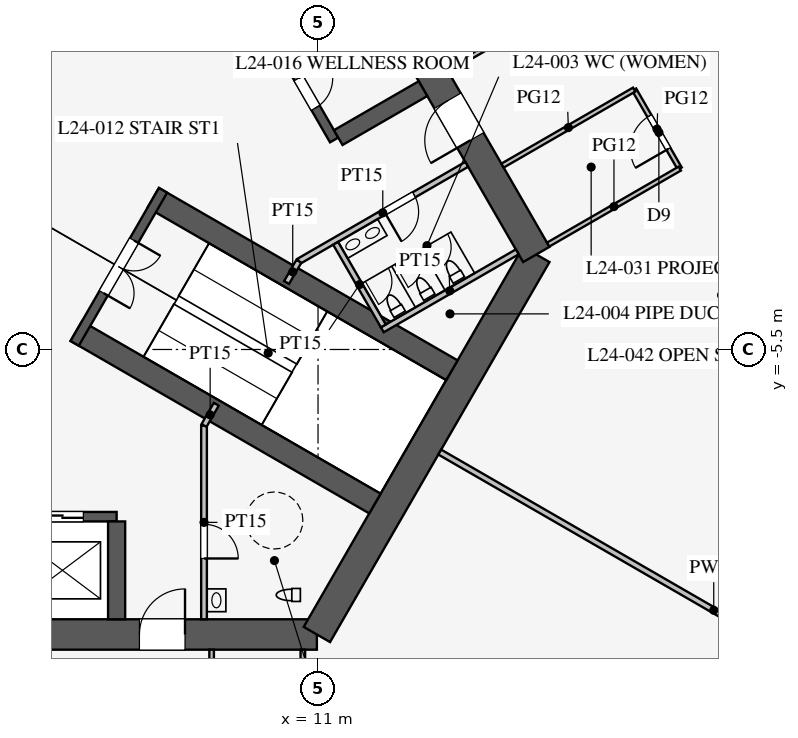
"""IFC4 building model, lengths in metres.
Left out: names, types, materials, properties, quantities, classifications, styles, units other than length and angle.
Written with IfcOpenShell. Run it as: python <this file> out.ifc"""

import sys

from ifc_helpers import new_model, si_unit, direction, frame, frame_2d, origin, place, context, subcontext, project, spatial, rectangle, extrude, element, fill, save


model = new_model("IFC4")
c1 = context("Model", 3, precision=1e-05, world=origin(), true_north=direction((0.0, 1.0)))
c2 = subcontext(c1, "Body", "Model", "MODEL_VIEW")
j1 = project(units=[si_unit("LENGTHUNIT", "METRE"), si_unit("PLANEANGLEUNIT", "RADIAN")], contexts=[c1])
p1 = place(None, origin())
s1 = spatial("IfcSite", under=j1, at=p1, CompositionType="ELEMENT")
p2 = place(p1, origin())
s2 = spatial("IfcBuilding", under=s1, at=p2, CompositionType="ELEMENT")
p3 = place(p2, frame((0.0, 0.0, 107.3)))
s3 = spatial("IfcBuildingStorey", under=s2, at=p3, CompositionType="ELEMENT", Elevation=107.3)
p4 = place(p3, frame((-10.97, -13.0, 0.0), z_axis=(0.0, 0.0, 1.0), x_axis=(1.0, 0.0, 0.0)))
e1 = element("IfcWall", 1, at=p4, inside=s3, PredefinedType="SHEAR", context=c2, shape_type="SweptSolid", body=[
    extrude(rectangle(XDim=21.939, YDim=0.8, at=frame_2d((10.97, 0.0))), origin(), (0.0, 0.0, 1.0), 4.2),
])
p5 = place(p4, frame((17.27, 0.0, 0.0)))
e2 = element("IfcOpeningElement", 2, at=p5, cuts=e1, PredefinedType="OPENING", context=c2, shape_type="SweptSolid", body=[
    extrude(rectangle(XDim=1.2, YDim=2.1, at=frame_2d((0.6, 1.05))), frame((0.0, 0.41, 0.0), z_axis=(0.0, -1.0, 0.0), x_axis=(1.0, 0.0, 0.0)), (0.0, 0.0, 1.0), 0.82),
])
p6 = place(p4, frame((3.47, 0.0, 0.0)))
e3 = element("IfcOpeningElement", 3, at=p6, cuts=e1, PredefinedType="OPENING", context=c2, shape_type="SweptSolid", body=[
    extrude(rectangle(XDim=1.2, YDim=2.1, at=frame_2d((0.6, 1.05))), frame((0.0, 0.41, 0.0), z_axis=(0.0, -1.0, 0.0), x_axis=(1.0, 0.0, 0.0)), (0.0, 0.0, 1.0), 0.82),
])
p7 = place(p3, frame((10.97, -13.0, 0.0), z_axis=(0.0, 0.0, 1.0), x_axis=(0.499995765644, 0.866027848477, 0.0)))
e4 = element("IfcWall", 4, at=p7, inside=s3, PredefinedType="SHEAR", context=c2, shape_type="SweptSolid", body=[
    extrude(rectangle(XDim=11.547, YDim=0.8, at=frame_2d((5.773, 0.0))), origin(), (0.0, 0.0, 1.0), 4.2),
])
p8 = place(p3, frame((16.743, -3.0, 0.0), z_axis=(0.0, 0.0, 1.0), x_axis=(-0.500002442456, 0.866023993627, 0.0)))
e5 = element("IfcWall", 5, at=p8, inside=s3, PredefinedType="SHEAR", context=c2, shape_type="SweptSolid", body=[
    extrude(rectangle(XDim=21.939, YDim=0.8, at=frame_2d((10.97, 0.0))), origin(), (0.0, 0.0, 1.0), 4.2),
])
p9 = place(p8, frame((17.27, 0.0, 0.0)))
e6 = element("IfcOpeningElement", 6, at=p9, cuts=e5, PredefinedType="OPENING", context=c2, shape_type="SweptSolid", body=[
    extrude(rectangle(XDim=1.2, YDim=2.1, at=frame_2d((0.6, 1.05))), frame((0.0, 0.41, 0.0), z_axis=(0.0, -1.0, 0.0), x_axis=(1.0, 0.0, 0.0)), (0.0, 0.0, 1.0), 0.82),
])
p10 = place(p8, frame((3.47, 0.0, 0.0)))
e7 = element("IfcOpeningElement", 7, at=p10, cuts=e5, PredefinedType="OPENING", context=c2, shape_type="SweptSolid", body=[
    extrude(rectangle(XDim=1.2, YDim=2.1, at=frame_2d((0.6, 1.05))), frame((0.0, 0.41, 0.0), z_axis=(0.0, -1.0, 0.0), x_axis=(1.0, 0.0, 0.0)), (0.0, 0.0, 1.0), 0.82),
])
p11 = place(p3, frame((-5.7, -9.9, 0.0), z_axis=(0.0, 0.0, 1.0), x_axis=(1.0, 0.0, 0.0)))
e8 = element("IfcWall", 8, at=p11, inside=s3, PredefinedType="SHEAR", context=c2, shape_type="SweptSolid", body=[
    extrude(rectangle(XDim=11.4, YDim=0.25, at=frame_2d((5.7, 0.0))), origin(), (0.0, 0.0, 1.0), 4.2),
])
p12 = place(p11, frame((0.875, 0.0, 0.0)))
e9 = element("IfcOpeningElement", 9, at=p12, cuts=e8, PredefinedType="OPENING", context=c2, shape_type="SweptSolid", body=[
    extrude(rectangle(XDim=1.1, YDim=2.2, at=frame_2d((0.55, 1.1))), frame((0.0, 0.135, 0.0), z_axis=(0.0, -1.0, 0.0), x_axis=(1.0, 0.0, 0.0)), (0.0, 0.0, 1.0), 0.27),
])
p13 = place(p11, frame((3.725, 0.0, 0.0)))
e10 = element("IfcOpeningElement", 10, at=p13, cuts=e8, PredefinedType="OPENING", context=c2, shape_type="SweptSolid", body=[
    extrude(rectangle(XDim=1.1, YDim=2.2, at=frame_2d((0.55, 1.1))), frame((0.0, 0.135, 0.0), z_axis=(0.0, -1.0, 0.0), x_axis=(1.0, 0.0, 0.0)), (0.0, 0.0, 1.0), 0.27),
])
p14 = place(p11, frame((6.575, 0.0, 0.0)))
e11 = element("IfcOpeningElement", 11, at=p14, cuts=e8, PredefinedType="OPENING", context=c2, shape_type="SweptSolid", body=[
    extrude(rectangle(XDim=1.1, YDim=2.2, at=frame_2d((0.55, 1.1))), frame((0.0, 0.135, 0.0), z_axis=(0.0, -1.0, 0.0), x_axis=(1.0, 0.0, 0.0)), (0.0, 0.0, 1.0), 0.27),
])
p15 = place(p11, frame((9.425, 0.0, 0.0)))
e12 = element("IfcOpeningElement", 12, at=p15, cuts=e8, PredefinedType="OPENING", context=c2, shape_type="SweptSolid", body=[
    extrude(rectangle(XDim=1.1, YDim=2.2, at=frame_2d((0.55, 1.1))), frame((0.0, 0.135, 0.0), z_axis=(0.0, -1.0, 0.0), x_axis=(1.0, 0.0, 0.0)), (0.0, 0.0, 1.0), 0.27),
])
p16 = place(p3, frame((5.7, -10.025, 0.0), z_axis=(0.0, 0.0, 1.0), x_axis=(0.0, -1.0, 0.0)))
e13 = element("IfcWall", 13, at=p16, inside=s3, PredefinedType="SHEAR", context=c2, shape_type="SweptSolid", body=[
    extrude(rectangle(XDim=2.575, YDim=0.45, at=frame_2d((1.288, 0.0))), origin(), (0.0, 0.0, 1.0), 4.2),
])
p17 = place(p3, frame((11.424, 0.014, 0.0), z_axis=(0.0, 0.0, 1.0), x_axis=(-0.500001763848, 0.866024385424, 0.0)))
e14 = element("IfcWall", 14, at=p17, inside=s3, PredefinedType="SHEAR", context=c2, shape_type="SweptSolid", body=[
    extrude(rectangle(XDim=11.4, YDim=0.25, at=frame_2d((5.7, 0.0))), origin(), (0.0, 0.0, 1.0), 4.2),
])
p18 = place(p17, frame((0.975, 0.0, 0.0)))
e15 = element("IfcOpeningElement", 15, at=p18, cuts=e14, PredefinedType="OPENING", context=c2, shape_type="SweptSolid", body=[
    extrude(rectangle(XDim=0.9, YDim=2.1, at=frame_2d((0.45, 1.05))), frame((0.0, 0.135, 0.0), z_axis=(0.0, -1.0, 0.0), x_axis=(1.0, 0.0, 0.0)), (0.0, 0.0, 1.0), 0.27),
])
p19 = place(p17, frame((3.825, 0.0, 0.0)))
e16 = element("IfcOpeningElement", 16, at=p19, cuts=e14, PredefinedType="OPENING", context=c2, shape_type="SweptSolid", body=[
    extrude(rectangle(XDim=0.9, YDim=2.1, at=frame_2d((0.45, 1.05))), frame((0.0, 0.135, 0.0), z_axis=(0.0, -1.0, 0.0), x_axis=(1.0, 0.0, 0.0)), (0.0, 0.0, 1.0), 0.27),
])
p20 = place(p3, frame((11.532, 0.076, 0.0), z_axis=(0.0, 0.0, 1.0), x_axis=(0.866005588531, 0.500034319456, 0.0)))
e17 = element("IfcWall", 17, at=p20, inside=s3, PredefinedType="SHEAR", context=c2, shape_type="SweptSolid", body=[
    extrude(rectangle(XDim=2.575, YDim=0.45, at=frame_2d((1.288, 0.0))), origin(), (0.0, 0.0, 1.0), 4.2),
])
for number, where, z_axis, x_axis in (
    (18, (4.638, -5.016, 0.0), (0.0, 0.0, 1.0), (0.866, -0.5, 0.0)),
    (19, (6.663, -1.509, 0.0), (0.0, 0.0, 1.0), (0.866, -0.5, 0.0)),
):
    element("IfcWall", number, at=place(p3, frame(where, z_axis=z_axis, x_axis=x_axis)), inside=s3, PredefinedType="SHEAR", context=c2, shape_type="SweptSolid", body=[
        extrude(rectangle(XDim=9.075, YDim=0.6, at=frame_2d((4.538, 0.0))), origin(), (0.0, 0.0, 1.0), 4.2),
    ])
p21 = place(p3, frame((4.597, -5.339, 0.0), z_axis=(0.0, 0.0, 1.0), x_axis=(0.499984536904, 0.866034331223, 0.0)))
e20 = element("IfcWall", 20, at=p21, inside=s3, PredefinedType="SHEAR", context=c2, shape_type="SweptSolid", body=[
    extrude(rectangle(XDim=4.65, YDim=0.25, at=frame_2d((2.325, 0.0))), origin(), (0.0, 0.0, 1.0), 4.2),
])
p22 = place(p21, frame((1.525, 0.0, 0.0)))
e21 = element("IfcOpeningElement", 21, at=p22, cuts=e20, PredefinedType="OPENING", context=c2, shape_type="SweptSolid", body=[
    extrude(rectangle(XDim=1.6, YDim=2.1, at=frame_2d((0.8, 1.05))), frame((0.0, 0.135, 0.0), z_axis=(0.0, -1.0, 0.0), x_axis=(1.0, 0.0, 0.0)), (0.0, 0.0, 1.0), 0.27),
])
p23 = place(p3, frame((8.0, -7.5, 0.0), z_axis=(0.0, 0.0, 1.0), x_axis=(0.0, -1.0, 0.0)))
e22 = element("IfcWall", 22, at=p23, inside=s3, PredefinedType="PARTITIONING", context=c2, shape_type="SweptSolid", body=[
    extrude(rectangle(XDim=5.1, YDim=0.15, at=frame_2d((2.55, 0.0))), origin(), (0.0, 0.0, 1.0), 4.0),
])
p24 = place(p23, frame((2.6, 0.0, 0.0)))
e23 = element("IfcOpeningElement", 23, at=p24, cuts=e22, PredefinedType="OPENING", context=c2, shape_type="SweptSolid", body=[
    extrude(rectangle(XDim=0.9, YDim=2.1, at=frame_2d((0.45, 1.05))), frame((0.0, 0.085, 0.0), z_axis=(0.0, -1.0, 0.0), x_axis=(1.0, 0.0, 0.0)), (0.0, 0.0, 1.0), 0.17),
])
p25 = place(p3, frame((10.495, -3.178, 0.0), z_axis=(0.0, 0.0, 1.0), x_axis=(0.86602216432, 0.500005610874, 0.0)))
e24 = element("IfcWall", 24, at=p25, inside=s3, PredefinedType="PARTITIONING", context=c2, shape_type="SweptSolid", body=[
    extrude(rectangle(XDim=5.1, YDim=0.15, at=frame_2d((2.55, 0.0))), origin(), (0.0, 0.0, 1.0), 4.0),
])
p26 = place(p25, frame((2.6, 0.0, 0.0)))
e25 = element("IfcOpeningElement", 25, at=p26, cuts=e24, PredefinedType="OPENING", context=c2, shape_type="SweptSolid", body=[
    extrude(rectangle(XDim=0.9, YDim=2.1, at=frame_2d((0.45, 1.05))), frame((0.0, 0.085, 0.0), z_axis=(0.0, -1.0, 0.0), x_axis=(1.0, 0.0, 0.0)), (0.0, 0.0, 1.0), 0.17),
])
for number, where, z_axis, x_axis in (
    (26, (8.0, -7.5, 0.0), (0.0, 0.0, 1.0), (0.5, 0.866, 0.0)),
    (27, (10.495, -3.178, 0.0), (0.0, 0.0, 1.0), (-0.5, -0.866, 0.0)),
):
    element("IfcWall", number, at=place(p3, frame(where, z_axis=z_axis, x_axis=x_axis)), inside=s3, PredefinedType="PARTITIONING", context=c2, shape_type="SweptSolid", body=[
        extrude(rectangle(XDim=0.645, YDim=0.15, at=frame_2d((0.323, 0.0))), origin(), (0.0, 0.0, 1.0), 4.0),
    ])
p27 = place(p3, frame((12.691, -4.982, 0.0), z_axis=(0.0, 0.0, 1.0), x_axis=(0.8660249478, 0.500000789788, 0.0)))
e28 = element("IfcWall", 28, at=p27, inside=s3, PredefinedType="PARTITIONING", context=c2, shape_type="SweptSolid", body=[
    extrude(rectangle(XDim=4.1, YDim=0.15, at=frame_2d((2.05, 0.0))), origin(), (0.0, 0.0, 1.0), 4.0),
])
p28 = place(p3, frame((11.464, -2.706, 0.0), z_axis=(0.0, 0.0, 1.0), x_axis=(0.50001992892, -0.866013897511, 0.0)))
e29 = element("IfcWall", 29, at=p28, inside=s3, PredefinedType="PARTITIONING", context=c2, shape_type="SweptSolid", body=[
    extrude(rectangle(XDim=2.51, YDim=0.15, at=frame_2d((1.255, 0.0))), origin(), (0.0, 0.0, 1.0), 4.0),
])
p29 = place(p3, frame((14.203, -8.2, 0.0), z_axis=(0.0, 0.0, 1.0), x_axis=(0.866024668836, -0.500001272966, 0.0)))
e30 = element("IfcWall", 30, at=p29, inside=s3, PredefinedType="PARTITIONING", context=c2, shape_type="SweptSolid", body=[
    extrude(rectangle(XDim=16.65, YDim=0.15, at=frame_2d((8.325, 0.0))), origin(), (0.0, 0.0, 1.0), 2.3),
])
for number, where, z_axis, x_axis in (
    (31, (10.6, -13.4, 0.0), (0.0, 0.0, 1.0), (0.0, -1.0, 0.0)),
    (32, (8.2, -13.4, 0.0), (0.0, 0.0, 1.0), (0.0, -1.0, 0.0)),
):
    element("IfcWall", number, at=place(p3, frame(where, z_axis=z_axis, x_axis=x_axis)), inside=s3, PredefinedType="PARTITIONING", context=c2, shape_type="SweptSolid", body=[
        extrude(rectangle(XDim=4.0, YDim=0.12, at=frame_2d((2.0, 0.0))), origin(), (0.0, 0.0, 1.0), 2.9),
    ])
p30 = place(p3, frame((20.519, -0.74, 0.0), z_axis=(0.0, 0.0, 1.0), x_axis=(-0.499957262057, 0.866050077142, 0.0)))
e33 = element("IfcWall", 33, at=p30, inside=s3, PredefinedType="PARTITIONING", context=c2, shape_type="SweptSolid", body=[
    extrude(rectangle(XDim=2.4, YDim=0.12, at=frame_2d((1.2, 0.0))), origin(), (0.0, 0.0, 1.0), 2.9),
])
p31 = place(p30, frame((0.6, 0.0, 0.15)))
e34 = element("IfcOpeningElement", 34, at=p31, cuts=e33, PredefinedType="OPENING", context=c2, shape_type="SweptSolid", body=[
    extrude(rectangle(XDim=1.0, YDim=2.1, at=frame_2d((0.5, 1.05))), frame((0.0, 0.07, 0.0), z_axis=(0.0, -1.0, 0.0), x_axis=(1.0, 0.0, 0.0)), (0.0, 0.0, 1.0), 0.14),
])
for number, where, z_axis, x_axis in (
    (35, (17.055, -2.74, 0.0), (0.0, 0.0, 1.0), (0.866, 0.5, 0.0)),
    (36, (14.405, 1.85, 0.0), (0.0, 0.0, 1.0), (0.866, 0.5, 0.0)),
    (37, (15.855, -0.661, 0.0), (0.0, 0.0, 1.0), (0.866, 0.5, 0.0)),
):
    element("IfcWall", number, at=place(p3, frame(where, z_axis=z_axis, x_axis=x_axis)), inside=s3, PredefinedType="PARTITIONING", context=c2, shape_type="SweptSolid", body=[
        extrude(rectangle(XDim=4.0, YDim=0.12, at=frame_2d((2.0, 0.0))), origin(), (0.0, 0.0, 1.0), 2.9),
    ])
p32 = place(p24, origin())
e38 = element("IfcDoor", 38, at=p32, inside=s3, OperationType="SINGLE_SWING_RIGHT", PredefinedType="DOOR", context=c2, shape_type="SweptSolid", body=[
    extrude(rectangle(XDim=0.9, YDim=2.1, at=frame_2d((0.45, 1.05))), frame((0.0, 0.025, 0.0), z_axis=(0.0, -1.0, 0.0), x_axis=(1.0, 0.0, 0.0)), (0.0, 0.0, 1.0), 0.05),
])
fill(e23, e38)
p33 = place(p26, frame((0.9, 0.0, 0.0), z_axis=(0.0, 0.0, 1.0), x_axis=(-1.0, 0.0, 0.0)))
e39 = element("IfcDoor", 39, at=p33, inside=s3, OperationType="SINGLE_SWING_RIGHT", PredefinedType="DOOR", context=c2, shape_type="SweptSolid", body=[
    extrude(rectangle(XDim=0.9, YDim=2.1, at=frame_2d((0.45, 1.05))), frame((0.0, 0.025, 0.0), z_axis=(0.0, -1.0, 0.0), x_axis=(1.0, 0.0, 0.0)), (0.0, 0.0, 1.0), 0.05),
])
fill(e25, e39)
p34 = place(p22, frame((1.6, 0.0, 0.0), z_axis=(0.0, 0.0, 1.0), x_axis=(-1.0, 0.0, 0.0)))
e40 = element("IfcDoor", 40, at=p34, inside=s3, OperationType="DOUBLE_DOOR_SINGLE_SWING", PredefinedType="DOOR", context=c2, shape_type="SweptSolid", body=[
    extrude(rectangle(XDim=1.6, YDim=2.1, at=frame_2d((0.8, 1.05))), frame((0.0, 0.025, 0.0), z_axis=(0.0, -1.0, 0.0), x_axis=(1.0, 0.0, 0.0)), (0.0, 0.0, 1.0), 0.05),
])
fill(e21, e40)
p35 = place(p5, origin())
e41 = element("IfcDoor", 41, at=p35, inside=s3, OperationType="SINGLE_SWING_RIGHT", PredefinedType="DOOR", context=c2, shape_type="SweptSolid", body=[
    extrude(rectangle(XDim=1.2, YDim=2.1, at=frame_2d((0.6, 1.05))), frame((0.0, 0.025, 0.0), z_axis=(0.0, -1.0, 0.0), x_axis=(1.0, 0.0, 0.0)), (0.0, 0.0, 1.0), 0.05),
])
fill(e2, e41)
p36 = place(p10, origin())
e42 = element("IfcDoor", 42, at=p36, inside=s3, OperationType="SINGLE_SWING_LEFT", PredefinedType="DOOR", context=c2, shape_type="SweptSolid", body=[
    extrude(rectangle(XDim=1.2, YDim=2.1, at=frame_2d((0.6, 1.05))), frame((0.0, 0.025, 0.0), z_axis=(0.0, -1.0, 0.0), x_axis=(1.0, 0.0, 0.0)), (0.0, 0.0, 1.0), 0.05),
])
fill(e7, e42)
p37 = place(p18, frame((0.9, 0.0, 0.0), z_axis=(0.0, 0.0, 1.0), x_axis=(-1.0, 0.0, 0.0)))
e43 = element("IfcDoor", 43, at=p37, inside=s3, OperationType="SINGLE_SWING_LEFT", PredefinedType="DOOR", context=c2, shape_type="SweptSolid", body=[
    extrude(rectangle(XDim=0.9, YDim=2.1, at=frame_2d((0.45, 1.05))), frame((0.0, 0.025, 0.0), z_axis=(0.0, -1.0, 0.0), x_axis=(1.0, 0.0, 0.0)), (0.0, 0.0, 1.0), 0.05),
])
fill(e15, e43)
p38 = place(p31, origin())
e44 = element("IfcDoor", 44, at=p38, inside=s3, OperationType="SINGLE_SWING_LEFT", PredefinedType="DOOR", context=c2, shape_type="SweptSolid", body=[
    extrude(rectangle(XDim=1.0, YDim=2.1, at=frame_2d((0.5, 1.05))), frame((0.0, 0.025, 0.0), z_axis=(0.0, -1.0, 0.0), x_axis=(1.0, 0.0, 0.0)), (0.0, 0.0, 1.0), 0.05),
])
fill(e34, e44)
p39 = place(p15, origin())
e45 = element("IfcDoor", 45, at=p39, inside=s3, OperationType="DOUBLE_DOOR_SLIDING", PredefinedType="DOOR", context=c2, shape_type="SweptSolid", body=[
    extrude(rectangle(XDim=1.1, YDim=2.2, at=frame_2d((0.55, 1.1))), frame((0.0, 0.025, 0.0), z_axis=(0.0, -1.0, 0.0), x_axis=(1.0, 0.0, 0.0)), (0.0, 0.0, 1.0), 0.05),
])
fill(e12, e45)
save(model, sys.argv[1])
